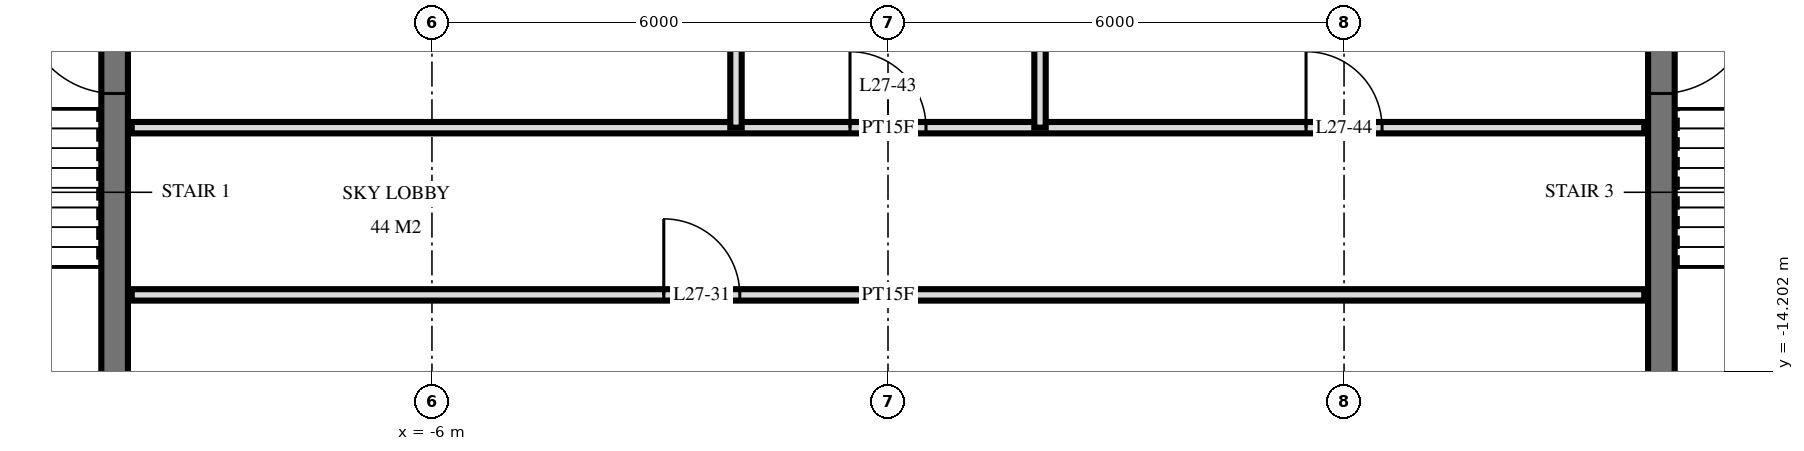
"""IFC4 building model, lengths in metres.
Left out: names, types, materials, properties, quantities, classifications, styles, units other than length and angle.
Written with IfcOpenShell. Run it as: python <this file> out.ifc"""

import sys

from ifc_helpers import new_model, si_unit, direction, frame, frame_2d, origin, place, context, subcontext, project, spatial, rectangle, extrude, element, fill, save


model = new_model("IFC4")
c1 = context("Model", 3, precision=1e-05, world=origin(), true_north=direction((0.0, 1.0)))
c2 = subcontext(c1, "Body", "Model", "MODEL_VIEW")
j1 = project(units=[si_unit("LENGTHUNIT", "METRE"), si_unit("PLANEANGLEUNIT", "RADIAN")], contexts=[c1])
p1 = place(None, origin())
s1 = spatial("IfcSite", under=j1, at=p1, CompositionType="ELEMENT")
p2 = place(p1, origin())
s2 = spatial("IfcBuilding", under=s1, at=p2, CompositionType="ELEMENT")
p3 = place(p2, frame((0.0, 0.0, 106.8)))
s3 = spatial("IfcBuildingStorey", under=s2, at=p3, CompositionType="ELEMENT", Elevation=106.8)
p4 = place(p3, frame((-10.175, -14.55, 0.0), z_axis=(0.0, 0.0, 1.0), x_axis=(0.0, 1.0, 0.0)))
e1 = element("IfcWall", 1, at=p4, inside=s3, PredefinedType="SHEAR", context=c2, shape_type="SweptSolid", body=[
    extrude(rectangle(XDim=14.1, YDim=0.35, at=frame_2d((7.05, 0.0))), origin(), (0.0, 0.0, 1.0), 6.0),
])
p5 = place(p4, frame((8.4, 0.0, 0.0)))
e2 = element("IfcOpeningElement", 2, at=p5, cuts=e1, PredefinedType="OPENING", context=c2, shape_type="SweptSolid", body=[
    extrude(rectangle(XDim=1.4, YDim=2.4, at=frame_2d((0.7, 1.2))), frame((0.0, 0.185, 0.0), z_axis=(0.0, -1.0, 0.0), x_axis=(1.0, 0.0, 0.0)), (0.0, 0.0, 1.0), 0.37),
])
p6 = place(p4, frame((10.0, 0.0, 0.0)))
e3 = element("IfcOpeningElement", 3, at=p6, cuts=e1, PredefinedType="OPENING", context=c2, shape_type="SweptSolid", body=[
    extrude(rectangle(XDim=1.4, YDim=2.4, at=frame_2d((0.7, 1.2))), frame((0.0, 0.185, 0.0), z_axis=(0.0, -1.0, 0.0), x_axis=(1.0, 0.0, 0.0)), (0.0, 0.0, 1.0), 0.37),
])
p7 = place(p4, frame((4.0, 0.0, 0.0)))
e4 = element("IfcOpeningElement", 4, at=p7, cuts=e1, PredefinedType="OPENING", context=c2, shape_type="SweptSolid", body=[
    extrude(rectangle(XDim=1.2, YDim=2.1, at=frame_2d((0.6, 1.05))), frame((0.0, 0.185, 0.0), z_axis=(0.0, -1.0, 0.0), x_axis=(1.0, 0.0, 0.0)), (0.0, 0.0, 1.0), 0.37),
])
p8 = place(p3, frame((10.175, -14.55, 0.0), z_axis=(0.0, 0.0, 1.0), x_axis=(0.0, 1.0, 0.0)))
e5 = element("IfcWall", 5, at=p8, inside=s3, PredefinedType="SHEAR", context=c2, shape_type="SweptSolid", body=[
    extrude(rectangle(XDim=14.1, YDim=0.35, at=frame_2d((7.05, 0.0))), origin(), (0.0, 0.0, 1.0), 6.0),
])
p9 = place(p8, frame((8.4, 0.0, 0.0)))
e6 = element("IfcOpeningElement", 6, at=p9, cuts=e5, PredefinedType="OPENING", context=c2, shape_type="SweptSolid", body=[
    extrude(rectangle(XDim=1.4, YDim=2.4, at=frame_2d((0.7, 1.2))), frame((0.0, 0.185, 0.0), z_axis=(0.0, -1.0, 0.0), x_axis=(1.0, 0.0, 0.0)), (0.0, 0.0, 1.0), 0.37),
])
p10 = place(p8, frame((10.0, 0.0, 0.0)))
e7 = element("IfcOpeningElement", 7, at=p10, cuts=e5, PredefinedType="OPENING", context=c2, shape_type="SweptSolid", body=[
    extrude(rectangle(XDim=1.4, YDim=2.4, at=frame_2d((0.7, 1.2))), frame((0.0, 0.185, 0.0), z_axis=(0.0, -1.0, 0.0), x_axis=(1.0, 0.0, 0.0)), (0.0, 0.0, 1.0), 0.37),
])
p11 = place(p8, frame((4.0, 0.0, 0.0)))
e8 = element("IfcOpeningElement", 8, at=p11, cuts=e5, PredefinedType="OPENING", context=c2, shape_type="SweptSolid", body=[
    extrude(rectangle(XDim=1.2, YDim=2.1, at=frame_2d((0.6, 1.05))), frame((0.0, 0.185, 0.0), z_axis=(0.0, -1.0, 0.0), x_axis=(1.0, 0.0, 0.0)), (0.0, 0.0, 1.0), 0.37),
])
for number, where, z_axis, x_axis in (
    (9, (2.0, -11.0, 0.0), (0.0, 0.0, 1.0), (0.0, 1.0, 0.0)),
    (10, (-2.0, -11.0, 0.0), (0.0, 0.0, 1.0), (0.0, 1.0, 0.0)),
):
    element("IfcWall", number, at=place(p3, frame(where, z_axis=z_axis, x_axis=x_axis)), inside=s3, PredefinedType="PARTITIONING", context=c2, shape_type="SweptSolid", body=[
        extrude(rectangle(XDim=4.0, YDim=0.15, at=frame_2d((2.0, 0.0))), origin(), (0.0, 0.0, 1.0), 5.7),
    ])
p12 = place(p3, frame((-9.95, -13.2, 0.0), z_axis=(0.0, 0.0, 1.0), x_axis=(1.0, 0.0, 0.0)))
e11 = element("IfcWall", 11, at=p12, inside=s3, PredefinedType="PARTITIONING", context=c2, shape_type="SweptSolid", body=[
    extrude(rectangle(XDim=19.9, YDim=0.15, at=frame_2d((9.95, 0.0))), origin(), (0.0, 0.0, 1.0), 5.7),
])
p13 = place(p12, frame((7.0, 0.0, 0.0)))
e12 = element("IfcOpeningElement", 12, at=p13, cuts=e11, PredefinedType="OPENING", context=c2, shape_type="SweptSolid", body=[
    extrude(rectangle(XDim=1.0, YDim=2.1, at=frame_2d((0.5, 1.05))), frame((0.0, 0.085, 0.0), z_axis=(0.0, -1.0, 0.0), x_axis=(1.0, 0.0, 0.0)), (0.0, 0.0, 1.0), 0.17),
])
p14 = place(p3, frame((-9.95, -11.0, 0.0), z_axis=(0.0, 0.0, 1.0), x_axis=(1.0, 0.0, 0.0)))
e13 = element("IfcWall", 13, at=p14, inside=s3, PredefinedType="PARTITIONING", context=c2, shape_type="SweptSolid", body=[
    extrude(rectangle(XDim=19.9, YDim=0.15, at=frame_2d((9.95, 0.0))), origin(), (0.0, 0.0, 1.0), 5.7),
])
p15 = place(p14, frame((9.45, 0.0, 0.0)))
e14 = element("IfcOpeningElement", 14, at=p15, cuts=e13, PredefinedType="OPENING", context=c2, shape_type="SweptSolid", body=[
    extrude(rectangle(XDim=1.0, YDim=2.1, at=frame_2d((0.5, 1.05))), frame((0.0, 0.085, 0.0), z_axis=(0.0, -1.0, 0.0), x_axis=(1.0, 0.0, 0.0)), (0.0, 0.0, 1.0), 0.17),
])
p16 = place(p14, frame((15.45, 0.0, 0.0)))
e15 = element("IfcOpeningElement", 15, at=p16, cuts=e13, PredefinedType="OPENING", context=c2, shape_type="SweptSolid", body=[
    extrude(rectangle(XDim=1.0, YDim=2.1, at=frame_2d((0.5, 1.05))), frame((0.0, 0.085, 0.0), z_axis=(0.0, -1.0, 0.0), x_axis=(1.0, 0.0, 0.0)), (0.0, 0.0, 1.0), 0.17),
])
p17 = place(p7, origin())
e16 = element("IfcDoor", 16, at=p17, inside=s3, OperationType="SINGLE_SWING_LEFT", PredefinedType="DOOR", context=c2, shape_type="SweptSolid", body=[
    extrude(rectangle(XDim=1.2, YDim=2.1, at=frame_2d((0.6, 1.05))), frame((0.0, 0.025, 0.0), z_axis=(0.0, -1.0, 0.0), x_axis=(1.0, 0.0, 0.0)), (0.0, 0.0, 1.0), 0.05),
])
fill(e4, e16)
p18 = place(p11, frame((0.6, 0.0, 0.0), z_axis=(0.0, 0.0, 1.0), x_axis=(-1.0, 0.0, 0.0)))
e17 = element("IfcDoor", 17, at=p18, inside=s3, OperationType="SINGLE_SWING_RIGHT", PredefinedType="DOOR", context=c2, shape_type="SweptSolid", body=[
    extrude(rectangle(XDim=1.2, YDim=2.1, at=frame_2d((0.0, 1.05))), frame((0.0, -0.025, 0.0), z_axis=(0.0, 1.0, 0.0), x_axis=(-1.0, 0.0, 0.0)), (0.0, 0.0, 1.0), 0.05),
])
fill(e8, e17)
p19 = place(p13, origin())
e18 = element("IfcDoor", 18, at=p19, inside=s3, OperationType="SINGLE_SWING_RIGHT", PredefinedType="DOOR", context=c2, shape_type="SweptSolid", body=[
    extrude(rectangle(XDim=1.0, YDim=2.1, at=frame_2d((0.5, 1.05))), frame((0.0, 0.025, 0.0), z_axis=(0.0, -1.0, 0.0), x_axis=(1.0, 0.0, 0.0)), (0.0, 0.0, 1.0), 0.05),
])
fill(e12, e18)
p20 = place(p15, origin())
e19 = element("IfcDoor", 19, at=p20, inside=s3, OperationType="SINGLE_SWING_RIGHT", PredefinedType="DOOR", context=c2, shape_type="SweptSolid", body=[
    extrude(rectangle(XDim=1.0, YDim=2.1, at=frame_2d((0.5, 1.05))), frame((0.0, 0.025, 0.0), z_axis=(0.0, -1.0, 0.0), x_axis=(1.0, 0.0, 0.0)), (0.0, 0.0, 1.0), 0.05),
])
fill(e14, e19)
p21 = place(p16, origin())
e20 = element("IfcDoor", 20, at=p21, inside=s3, OperationType="SINGLE_SWING_RIGHT", PredefinedType="DOOR", context=c2, shape_type="SweptSolid", body=[
    extrude(rectangle(XDim=1.0, YDim=2.1, at=frame_2d((0.5, 1.05))), frame((0.0, 0.025, 0.0), z_axis=(0.0, -1.0, 0.0), x_axis=(1.0, 0.0, 0.0)), (0.0, 0.0, 1.0), 0.05),
])
fill(e15, e20)
save(model, sys.argv[1])
